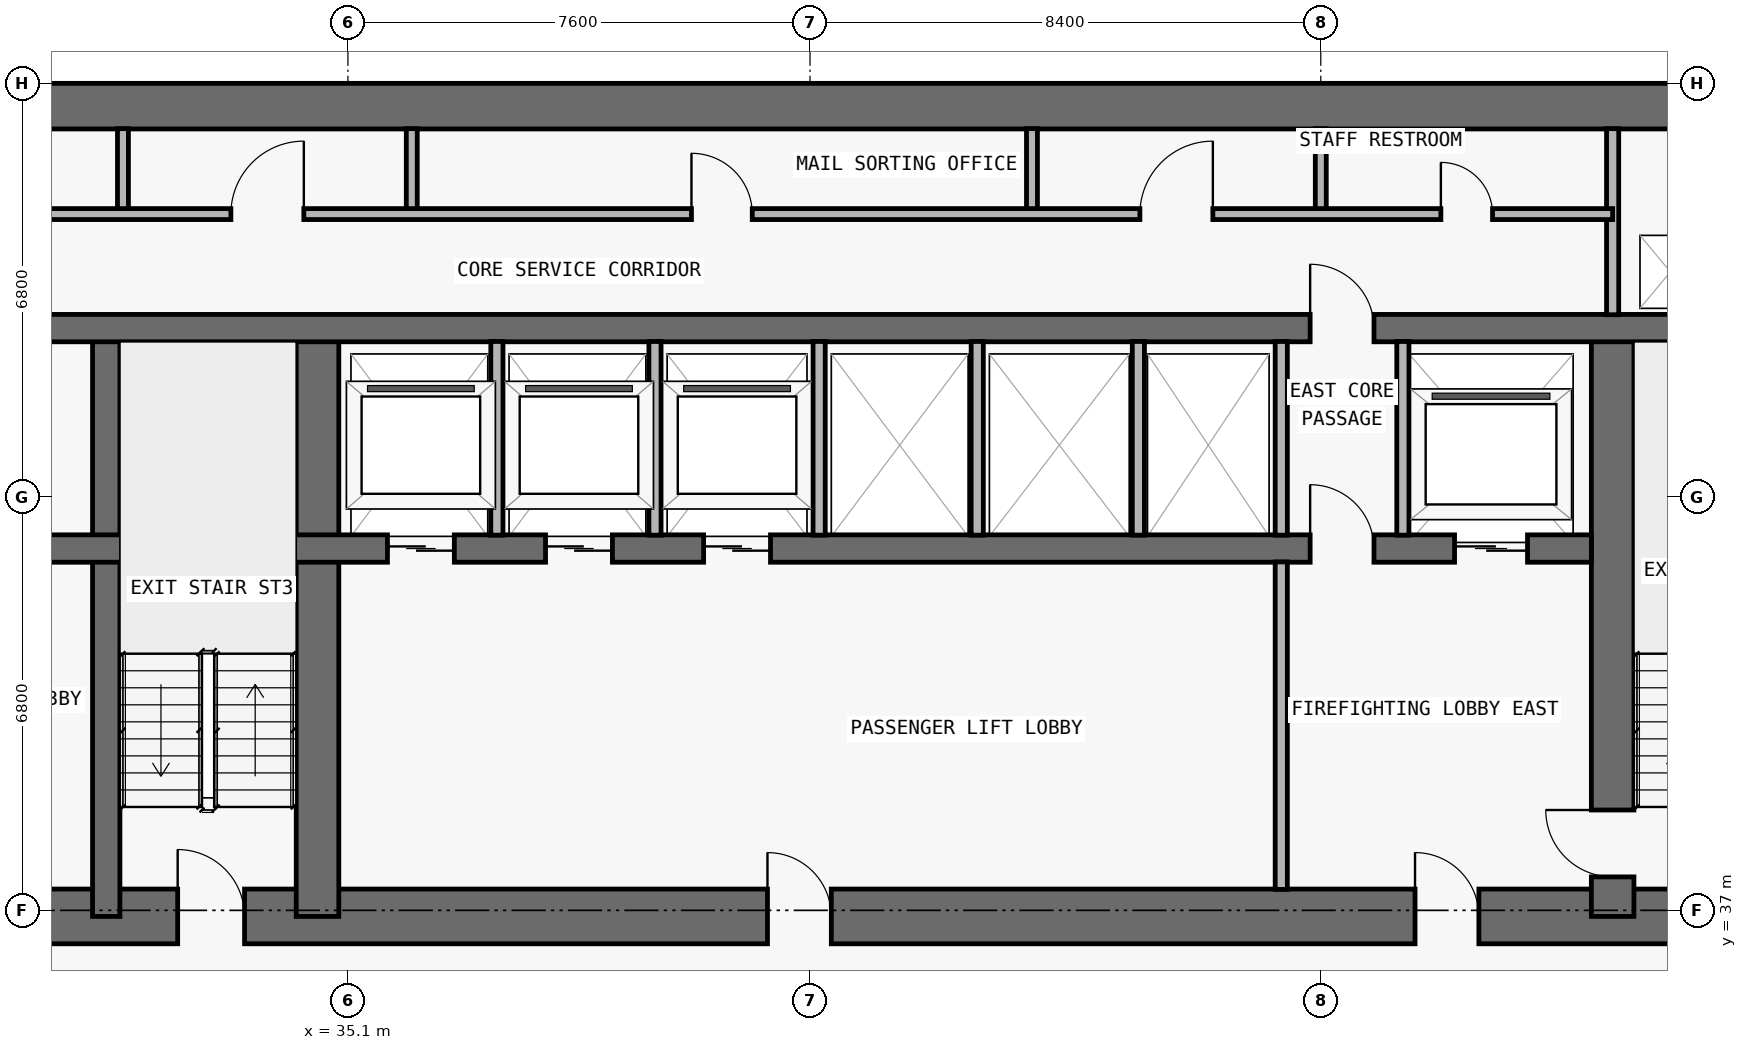
"""IFC4 building model, lengths in metres.
Left out: names, types, materials, properties, quantities, classifications, styles, units other than length and angle.
Written with IfcOpenShell. Run it as: python <this file> out.ifc"""

import sys

from ifc_helpers import new_model, si_unit, direction, frame, frame_2d, origin, place, context, subcontext, project, spatial, rectangle, extrude, element, fill, save


model = new_model("IFC4")
c1 = context("Model", 3, precision=1e-05, world=origin(), true_north=direction((0.0, 1.0)))
c2 = subcontext(c1, "Body", "Model", "MODEL_VIEW")
j1 = project(units=[si_unit("LENGTHUNIT", "METRE"), si_unit("PLANEANGLEUNIT", "RADIAN")], contexts=[c1])
p1 = place(None, origin())
s1 = spatial("IfcSite", under=j1, at=p1, CompositionType="ELEMENT")
p2 = place(p1, origin())
s2 = spatial("IfcBuilding", under=s1, at=p2, CompositionType="ELEMENT")
p3 = place(p2, frame((0.0, 0.0, 66.3)))
s3 = spatial("IfcBuildingStorey", under=s2, at=p3, CompositionType="ELEMENT", Elevation=66.3)
p4 = place(p3, frame((17.75, 36.9, 0.0), z_axis=(0.0, 0.0, 1.0), x_axis=(1.0, 0.0, 0.0)))
e1 = element("IfcWall", 1, at=p4, inside=s3, PredefinedType="SHEAR", context=c2, shape_type="SweptSolid", body=[
    extrude(rectangle(XDim=42.3, YDim=0.9, at=frame_2d((21.15, 0.0))), origin(), (0.0, 0.0, 1.0), 3.05),
])
p5 = place(p4, frame((14.55, 0.0, 0.0)))
e2 = element("IfcOpeningElement", 2, at=p5, cuts=e1, PredefinedType="OPENING", context=c2, shape_type="SweptSolid", body=[
    extrude(rectangle(XDim=1.1, YDim=2.15, at=frame_2d((0.55, 1.075))), frame((0.0, 0.46, 0.0), z_axis=(0.0, -1.0, 0.0), x_axis=(1.0, 0.0, 0.0)), (0.0, 0.0, 1.0), 0.92),
])
p6 = place(p4, frame((6.4, 0.0, 0.0)))
e3 = element("IfcOpeningElement", 3, at=p6, cuts=e1, PredefinedType="OPENING", context=c2, shape_type="SweptSolid", body=[
    extrude(rectangle(XDim=1.05, YDim=2.15, at=frame_2d((0.525, 1.075))), frame((0.0, 0.46, 0.0), z_axis=(0.0, -1.0, 0.0), x_axis=(1.0, 0.0, 0.0)), (0.0, 0.0, 1.0), 0.92),
])
p7 = place(p4, frame((34.9, 0.0, 0.0)))
e4 = element("IfcOpeningElement", 4, at=p7, cuts=e1, PredefinedType="OPENING", context=c2, shape_type="SweptSolid", body=[
    extrude(rectangle(XDim=1.05, YDim=2.15, at=frame_2d((0.525, 1.075))), frame((0.0, 0.46, 0.0), z_axis=(0.0, -1.0, 0.0), x_axis=(1.0, 0.0, 0.0)), (0.0, 0.0, 1.0), 0.92),
])
p8 = place(p4, frame((11.012, 0.0, 0.0)))
e5 = element("IfcOpeningElement", 5, at=p8, cuts=e1, PredefinedType="OPENING", context=c2, shape_type="SweptSolid", body=[
    extrude(rectangle(XDim=1.05, YDim=2.15, at=frame_2d((0.525, 1.075))), frame((0.0, 0.46, 0.0), z_axis=(0.0, -1.0, 0.0), x_axis=(1.0, 0.0, 0.0)), (0.0, 0.0, 1.0), 0.92),
])
p9 = place(p4, frame((24.25, 0.0, 0.0)))
e6 = element("IfcOpeningElement", 6, at=p9, cuts=e1, PredefinedType="OPENING", context=c2, shape_type="SweptSolid", body=[
    extrude(rectangle(XDim=1.05, YDim=2.15, at=frame_2d((0.525, 1.075))), frame((0.0, 0.46, 0.0), z_axis=(0.0, -1.0, 0.0), x_axis=(1.0, 0.0, 0.0)), (0.0, 0.0, 1.0), 0.92),
])
p10 = place(p3, frame((17.75, 50.225, 0.0), z_axis=(0.0, 0.0, 1.0), x_axis=(1.0, 0.0, 0.0)))
e7 = element("IfcWall", 7, at=p10, inside=s3, PredefinedType="SHEAR", context=c2, shape_type="SweptSolid", body=[
    extrude(rectangle(XDim=42.3, YDim=0.75, at=frame_2d((21.15, 0.0))), origin(), (0.0, 0.0, 1.0), 3.05),
])
p11 = place(p3, frame((55.9, 36.9, 0.0), z_axis=(0.0, 0.0, 1.0), x_axis=(0.0, 1.0, 0.0)))
e8 = element("IfcWall", 8, at=p11, inside=s3, PredefinedType="SHEAR", context=c2, shape_type="SweptSolid", body=[
    extrude(rectangle(XDim=9.675, YDim=0.7, at=frame_2d((4.837, 0.0))), origin(), (0.0, 0.0, 1.0), 3.05),
])
p12 = place(p11, frame((0.65, 0.0, 0.0)))
e9 = element("IfcOpeningElement", 9, at=p12, cuts=e8, PredefinedType="OPENING", context=c2, shape_type="SweptSolid", body=[
    extrude(rectangle(XDim=1.1, YDim=2.15, at=frame_2d((0.55, 1.075))), frame((0.0, 0.36, 0.0), z_axis=(0.0, -1.0, 0.0), x_axis=(1.0, 0.0, 0.0)), (0.0, 0.0, 1.0), 0.72),
])
p13 = place(p3, frame((31.125, 36.9, 0.0), z_axis=(0.0, 0.0, 1.0), x_axis=(0.0, 1.0, 0.0)))
e10 = element("IfcWall", 10, at=p13, inside=s3, PredefinedType="SHEAR", context=c2, shape_type="SweptSolid", body=[
    extrude(rectangle(XDim=9.675, YDim=0.45, at=frame_2d((4.837, 0.0))), origin(), (0.0, 0.0, 1.0), 3.05),
])
p14 = place(p3, frame((34.6, 36.9, 0.0), z_axis=(0.0, 0.0, 1.0), x_axis=(0.0, 1.0, 0.0)))
e11 = element("IfcWall", 11, at=p14, inside=s3, PredefinedType="SHEAR", context=c2, shape_type="SweptSolid", body=[
    extrude(rectangle(XDim=9.675, YDim=0.7, at=frame_2d((4.837, 0.0))), origin(), (0.0, 0.0, 1.0), 3.05),
])
p15 = place(p3, frame((22.25, 42.95, 0.0), z_axis=(0.0, 0.0, 1.0), x_axis=(1.0, 0.0, 0.0)))
e12 = element("IfcWall", 12, at=p15, inside=s3, PredefinedType="SHEAR", context=c2, shape_type="SweptSolid", body=[
    extrude(rectangle(XDim=33.3, YDim=0.45, at=frame_2d((16.65, 0.0))), origin(), (0.0, 0.0, 1.0), 3.05),
])
p16 = place(p15, frame((1.05, 0.0, 0.0)))
e13 = element("IfcOpeningElement", 13, at=p16, cuts=e12, PredefinedType="OPENING", context=c2, shape_type="SweptSolid", body=[
    extrude(rectangle(XDim=1.2, YDim=2.2, at=frame_2d((0.6, 1.1))), frame((0.0, 0.235, 0.0), z_axis=(0.0, -1.0, 0.0), x_axis=(1.0, 0.0, 0.0)), (0.0, 0.0, 1.0), 0.47),
])
p17 = place(p15, frame((31.05, 0.0, 0.0)))
e14 = element("IfcOpeningElement", 14, at=p17, cuts=e12, PredefinedType="OPENING", context=c2, shape_type="SweptSolid", body=[
    extrude(rectangle(XDim=1.2, YDim=2.2, at=frame_2d((0.6, 1.1))), frame((0.0, 0.235, 0.0), z_axis=(0.0, -1.0, 0.0), x_axis=(1.0, 0.0, 0.0)), (0.0, 0.0, 1.0), 0.47),
])
p18 = place(p15, frame((13.5, 0.0, 0.0)))
e15 = element("IfcOpeningElement", 15, at=p18, cuts=e12, PredefinedType="OPENING", context=c2, shape_type="SweptSolid", body=[
    extrude(rectangle(XDim=1.1, YDim=2.2, at=frame_2d((0.55, 1.1))), frame((0.0, 0.235, 0.0), z_axis=(0.0, -1.0, 0.0), x_axis=(1.0, 0.0, 0.0)), (0.0, 0.0, 1.0), 0.47),
])
p19 = place(p15, frame((16.1, 0.0, 0.0)))
e16 = element("IfcOpeningElement", 16, at=p19, cuts=e12, PredefinedType="OPENING", context=c2, shape_type="SweptSolid", body=[
    extrude(rectangle(XDim=1.1, YDim=2.2, at=frame_2d((0.55, 1.1))), frame((0.0, 0.235, 0.0), z_axis=(0.0, -1.0, 0.0), x_axis=(1.0, 0.0, 0.0)), (0.0, 0.0, 1.0), 0.47),
])
p20 = place(p15, frame((18.7, 0.0, 0.0)))
e17 = element("IfcOpeningElement", 17, at=p20, cuts=e12, PredefinedType="OPENING", context=c2, shape_type="SweptSolid", body=[
    extrude(rectangle(XDim=1.1, YDim=2.2, at=frame_2d((0.55, 1.1))), frame((0.0, 0.235, 0.0), z_axis=(0.0, -1.0, 0.0), x_axis=(1.0, 0.0, 0.0)), (0.0, 0.0, 1.0), 0.47),
])
p21 = place(p15, frame((3.625, 0.0, 0.0)))
e18 = element("IfcOpeningElement", 18, at=p21, cuts=e12, PredefinedType="OPENING", context=c2, shape_type="SweptSolid", body=[
    extrude(rectangle(XDim=1.05, YDim=2.15, at=frame_2d((0.525, 1.075))), frame((0.0, 0.235, 0.0), z_axis=(0.0, -1.0, 0.0), x_axis=(1.0, 0.0, 0.0)), (0.0, 0.0, 1.0), 0.47),
])
p22 = place(p15, frame((28.675, 0.0, 0.0)))
e19 = element("IfcOpeningElement", 19, at=p22, cuts=e12, PredefinedType="OPENING", context=c2, shape_type="SweptSolid", body=[
    extrude(rectangle(XDim=1.05, YDim=2.15, at=frame_2d((0.525, 1.075))), frame((0.0, 0.235, 0.0), z_axis=(0.0, -1.0, 0.0), x_axis=(1.0, 0.0, 0.0)), (0.0, 0.0, 1.0), 0.47),
])
p23 = place(p3, frame((18.2, 46.575, 0.0), z_axis=(0.0, 0.0, 1.0), x_axis=(1.0, 0.0, 0.0)))
e20 = element("IfcWall", 20, at=p23, inside=s3, PredefinedType="SHEAR", context=c2, shape_type="SweptSolid", body=[
    extrude(rectangle(XDim=41.4, YDim=0.45, at=frame_2d((20.7, 0.0))), origin(), (0.0, 0.0, 1.0), 3.05),
])
p24 = place(p23, frame((7.675, 0.0, 0.0)))
e21 = element("IfcOpeningElement", 21, at=p24, cuts=e20, PredefinedType="OPENING", context=c2, shape_type="SweptSolid", body=[
    extrude(rectangle(XDim=1.05, YDim=2.15, at=frame_2d((0.525, 1.075))), frame((0.0, 0.235, 0.0), z_axis=(0.0, -1.0, 0.0), x_axis=(1.0, 0.0, 0.0)), (0.0, 0.0, 1.0), 0.47),
])
p25 = place(p23, frame((32.725, 0.0, 0.0)))
e22 = element("IfcOpeningElement", 22, at=p25, cuts=e20, PredefinedType="OPENING", context=c2, shape_type="SweptSolid", body=[
    extrude(rectangle(XDim=1.05, YDim=2.15, at=frame_2d((0.525, 1.075))), frame((0.0, 0.235, 0.0), z_axis=(0.0, -1.0, 0.0), x_axis=(1.0, 0.0, 0.0)), (0.0, 0.0, 1.0), 0.47),
])
for number, where, z_axis, x_axis in (
    (23, (31.4, 48.45, 0.0), (0.0, 0.0, 1.0), (0.0, 1.0, 0.0)),
    (24, (36.15, 48.45, 0.0), (0.0, 0.0, 1.0), (0.0, 1.0, 0.0)),
):
    element("IfcWall", number, at=place(p3, frame(where, z_axis=z_axis, x_axis=x_axis)), inside=s3, PredefinedType="PARTITIONING", context=c2, shape_type="SweptSolid", body=[
        extrude(rectangle(XDim=1.405, YDim=0.18, at=frame_2d((0.703, 0.0))), origin(), (0.0, 0.0, 1.0), 3.05),
    ])
for number, where, z_axis, x_axis in (
    (25, (37.55, 43.17, 0.0), (0.0, 0.0, 1.0), (0.0, 1.0, 0.0)),
    (26, (40.15, 43.17, 0.0), (0.0, 0.0, 1.0), (0.0, 1.0, 0.0)),
    (27, (42.85, 43.17, 0.0), (0.0, 0.0, 1.0), (0.0, 1.0, 0.0)),
    (28, (45.45, 43.17, 0.0), (0.0, 0.0, 1.0), (0.0, 1.0, 0.0)),
):
    element("IfcWall", number, at=place(p3, frame(where, z_axis=z_axis, x_axis=x_axis)), inside=s3, PredefinedType="PARTITIONING", context=c2, shape_type="SweptSolid", body=[
        extrude(rectangle(XDim=3.185, YDim=0.2, at=frame_2d((1.593, 0.0))), origin(), (0.0, 0.0, 1.0), 3.05),
    ])
p26 = place(p3, frame((46.35, 48.45, 0.0), z_axis=(0.0, 0.0, 1.0), x_axis=(0.0, 1.0, 0.0)))
e29 = element("IfcWall", 29, at=p26, inside=s3, PredefinedType="PARTITIONING", context=c2, shape_type="SweptSolid", body=[
    extrude(rectangle(XDim=1.405, YDim=0.18, at=frame_2d((0.703, 0.0))), origin(), (0.0, 0.0, 1.0), 3.05),
])
p27 = place(p3, frame((48.1, 43.17, 0.0), z_axis=(0.0, 0.0, 1.0), x_axis=(0.0, 1.0, 0.0)))
e30 = element("IfcWall", 30, at=p27, inside=s3, PredefinedType="PARTITIONING", context=c2, shape_type="SweptSolid", body=[
    extrude(rectangle(XDim=3.185, YDim=0.2, at=frame_2d((1.593, 0.0))), origin(), (0.0, 0.0, 1.0), 3.05),
])
p28 = place(p3, frame((50.45, 37.345, 0.0), z_axis=(0.0, 0.0, 1.0), x_axis=(0.0, 1.0, 0.0)))
e31 = element("IfcWall", 31, at=p28, inside=s3, PredefinedType="PARTITIONING", context=c2, shape_type="SweptSolid", body=[
    extrude(rectangle(XDim=5.385, YDim=0.2, at=frame_2d((2.692, 0.0))), origin(), (0.0, 0.0, 1.0), 3.05),
])
p29 = place(p3, frame((50.45, 43.17, 0.0), z_axis=(0.0, 0.0, 1.0), x_axis=(0.0, 1.0, 0.0)))
e32 = element("IfcWall", 32, at=p29, inside=s3, PredefinedType="PARTITIONING", context=c2, shape_type="SweptSolid", body=[
    extrude(rectangle(XDim=3.185, YDim=0.2, at=frame_2d((1.593, 0.0))), origin(), (0.0, 0.0, 1.0), 3.05),
])
p30 = place(p3, frame((51.1, 48.45, 0.0), z_axis=(0.0, 0.0, 1.0), x_axis=(0.0, 1.0, 0.0)))
e33 = element("IfcWall", 33, at=p30, inside=s3, PredefinedType="PARTITIONING", context=c2, shape_type="SweptSolid", body=[
    extrude(rectangle(XDim=1.405, YDim=0.18, at=frame_2d((0.703, 0.0))), origin(), (0.0, 0.0, 1.0), 3.05),
])
p31 = place(p3, frame((52.45, 43.17, 0.0), z_axis=(0.0, 0.0, 1.0), x_axis=(0.0, 1.0, 0.0)))
e34 = element("IfcWall", 34, at=p31, inside=s3, PredefinedType="PARTITIONING", context=c2, shape_type="SweptSolid", body=[
    extrude(rectangle(XDim=3.185, YDim=0.2, at=frame_2d((1.593, 0.0))), origin(), (0.0, 0.0, 1.0), 3.05),
])
p32 = place(p3, frame((55.9, 46.795, 0.0), z_axis=(0.0, 0.0, 1.0), x_axis=(0.0, 1.0, 0.0)))
e35 = element("IfcWall", 35, at=p32, inside=s3, PredefinedType="PARTITIONING", context=c2, shape_type="SweptSolid", body=[
    extrude(rectangle(XDim=3.06, YDim=0.2, at=frame_2d((1.53, 0.0))), origin(), (0.0, 0.0, 1.0), 3.05),
])
p33 = place(p3, frame((26.7, 48.45, 0.0), z_axis=(0.0, 0.0, 1.0), x_axis=(1.0, 0.0, 0.0)))
e36 = element("IfcWall", 36, at=p33, inside=s3, PredefinedType="PARTITIONING", context=c2, shape_type="SweptSolid", body=[
    extrude(rectangle(XDim=29.2, YDim=0.18, at=frame_2d((14.6, 0.0))), origin(), (0.0, 0.0, 1.0), 3.05),
])
p34 = place(p33, frame((1.75, 0.0, 0.0)))
e37 = element("IfcOpeningElement", 37, at=p34, cuts=e36, PredefinedType="OPENING", context=c2, shape_type="SweptSolid", body=[
    extrude(rectangle(XDim=1.2, YDim=2.2, at=frame_2d((0.6, 1.1))), frame((0.0, 0.1, 0.0), z_axis=(0.0, -1.0, 0.0), x_axis=(1.0, 0.0, 0.0)), (0.0, 0.0, 1.0), 0.2),
])
p35 = place(p33, frame((6.475, 0.0, 0.0)))
e38 = element("IfcOpeningElement", 38, at=p35, cuts=e36, PredefinedType="OPENING", context=c2, shape_type="SweptSolid", body=[
    extrude(rectangle(XDim=1.2, YDim=2.2, at=frame_2d((0.6, 1.1))), frame((0.0, 0.1, 0.0), z_axis=(0.0, -1.0, 0.0), x_axis=(1.0, 0.0, 0.0)), (0.0, 0.0, 1.0), 0.2),
])
p36 = place(p33, frame((14.05, 0.0, 0.0)))
e39 = element("IfcOpeningElement", 39, at=p36, cuts=e36, PredefinedType="OPENING", context=c2, shape_type="SweptSolid", body=[
    extrude(rectangle(XDim=1.0, YDim=2.2, at=frame_2d((0.5, 1.1))), frame((0.0, 0.1, 0.0), z_axis=(0.0, -1.0, 0.0), x_axis=(1.0, 0.0, 0.0)), (0.0, 0.0, 1.0), 0.2),
])
p37 = place(p33, frame((21.425, 0.0, 0.0)))
e40 = element("IfcOpeningElement", 40, at=p37, cuts=e36, PredefinedType="OPENING", context=c2, shape_type="SweptSolid", body=[
    extrude(rectangle(XDim=1.2, YDim=2.2, at=frame_2d((0.6, 1.1))), frame((0.0, 0.1, 0.0), z_axis=(0.0, -1.0, 0.0), x_axis=(1.0, 0.0, 0.0)), (0.0, 0.0, 1.0), 0.2),
])
p38 = place(p33, frame((26.375, 0.0, 0.0)))
e41 = element("IfcOpeningElement", 41, at=p38, cuts=e36, PredefinedType="OPENING", context=c2, shape_type="SweptSolid", body=[
    extrude(rectangle(XDim=0.85, YDim=2.1, at=frame_2d((0.425, 1.05))), frame((0.0, 0.1, 0.0), z_axis=(0.0, -1.0, 0.0), x_axis=(1.0, 0.0, 0.0)), (0.0, 0.0, 1.0), 0.2),
])
p39 = place(p17, origin())
e42 = element("IfcDoor", 42, at=p39, inside=s3, OperationType="DOUBLE_DOOR_SLIDING", PredefinedType="DOOR", context=c2, shape_type="SweptSolid", body=[
    extrude(rectangle(XDim=1.2, YDim=2.2, at=frame_2d((0.6, 1.1))), frame((0.0, 0.025, 0.0), z_axis=(0.0, -1.0, 0.0), x_axis=(1.0, 0.0, 0.0)), (0.0, 0.0, 1.0), 0.05),
])
fill(e14, e42)
p40 = place(p18, origin())
e43 = element("IfcDoor", 43, at=p40, inside=s3, OperationType="DOUBLE_DOOR_SLIDING", PredefinedType="DOOR", context=c2, shape_type="SweptSolid", body=[
    extrude(rectangle(XDim=1.1, YDim=2.2, at=frame_2d((0.55, 1.1))), frame((0.0, 0.025, 0.0), z_axis=(0.0, -1.0, 0.0), x_axis=(1.0, 0.0, 0.0)), (0.0, 0.0, 1.0), 0.05),
])
fill(e15, e43)
p41 = place(p19, origin())
e44 = element("IfcDoor", 44, at=p41, inside=s3, OperationType="DOUBLE_DOOR_SLIDING", PredefinedType="DOOR", context=c2, shape_type="SweptSolid", body=[
    extrude(rectangle(XDim=1.1, YDim=2.2, at=frame_2d((0.55, 1.1))), frame((0.0, 0.025, 0.0), z_axis=(0.0, -1.0, 0.0), x_axis=(1.0, 0.0, 0.0)), (0.0, 0.0, 1.0), 0.05),
])
fill(e16, e44)
p42 = place(p20, origin())
e45 = element("IfcDoor", 45, at=p42, inside=s3, OperationType="DOUBLE_DOOR_SLIDING", PredefinedType="DOOR", context=c2, shape_type="SweptSolid", body=[
    extrude(rectangle(XDim=1.1, YDim=2.2, at=frame_2d((0.55, 1.1))), frame((0.0, 0.025, 0.0), z_axis=(0.0, -1.0, 0.0), x_axis=(1.0, 0.0, 0.0)), (0.0, 0.0, 1.0), 0.05),
])
fill(e17, e45)
p43 = place(p5, origin())
e46 = element("IfcDoor", 46, at=p43, inside=s3, OperationType="SINGLE_SWING_LEFT", PredefinedType="DOOR", context=c2, shape_type="SweptSolid", body=[
    extrude(rectangle(XDim=1.1, YDim=2.15, at=frame_2d((0.55, 1.075))), frame((0.0, 0.025, 0.0), z_axis=(0.0, -1.0, 0.0), x_axis=(1.0, 0.0, 0.0)), (0.0, 0.0, 1.0), 0.05),
])
fill(e2, e46)
p44 = place(p7, origin())
e47 = element("IfcDoor", 47, at=p44, inside=s3, OperationType="SINGLE_SWING_LEFT", PredefinedType="DOOR", context=c2, shape_type="SweptSolid", body=[
    extrude(rectangle(XDim=1.05, YDim=2.15, at=frame_2d((0.525, 1.075))), frame((0.0, 0.025, 0.0), z_axis=(0.0, -1.0, 0.0), x_axis=(1.0, 0.0, 0.0)), (0.0, 0.0, 1.0), 0.05),
])
fill(e4, e47)
p45 = place(p12, origin())
e48 = element("IfcDoor", 48, at=p45, inside=s3, OperationType="SINGLE_SWING_RIGHT", PredefinedType="DOOR", context=c2, shape_type="SweptSolid", body=[
    extrude(rectangle(XDim=1.1, YDim=2.15, at=frame_2d((0.55, 1.075))), frame((0.0, 0.025, 0.0), z_axis=(0.0, -1.0, 0.0), x_axis=(1.0, 0.0, 0.0)), (0.0, 0.0, 1.0), 0.05),
])
fill(e9, e48)
p46 = place(p22, origin())
e49 = element("IfcDoor", 49, at=p46, inside=s3, OperationType="SINGLE_SWING_LEFT", PredefinedType="DOOR", context=c2, shape_type="SweptSolid", body=[
    extrude(rectangle(XDim=1.05, YDim=2.15, at=frame_2d((0.525, 1.075))), frame((0.0, 0.025, 0.0), z_axis=(0.0, -1.0, 0.0), x_axis=(1.0, 0.0, 0.0)), (0.0, 0.0, 1.0), 0.05),
])
fill(e19, e49)
p47 = place(p9, origin())
e50 = element("IfcDoor", 50, at=p47, inside=s3, OperationType="SINGLE_SWING_LEFT", PredefinedType="DOOR", context=c2, shape_type="SweptSolid", body=[
    extrude(rectangle(XDim=1.05, YDim=2.15, at=frame_2d((0.525, 1.075))), frame((0.0, 0.025, 0.0), z_axis=(0.0, -1.0, 0.0), x_axis=(1.0, 0.0, 0.0)), (0.0, 0.0, 1.0), 0.05),
])
fill(e6, e50)
p48 = place(p25, origin())
e51 = element("IfcDoor", 51, at=p48, inside=s3, OperationType="SINGLE_SWING_LEFT", PredefinedType="DOOR", context=c2, shape_type="SweptSolid", body=[
    extrude(rectangle(XDim=1.05, YDim=2.15, at=frame_2d((0.525, 1.075))), frame((0.0, 0.025, 0.0), z_axis=(0.0, -1.0, 0.0), x_axis=(1.0, 0.0, 0.0)), (0.0, 0.0, 1.0), 0.05),
])
fill(e22, e51)
p49 = place(p35, origin())
e52 = element("IfcDoor", 52, at=p49, inside=s3, OperationType="SINGLE_SWING_RIGHT", PredefinedType="DOOR", context=c2, shape_type="SweptSolid", body=[
    extrude(rectangle(XDim=1.2, YDim=2.2, at=frame_2d((0.6, 1.1))), frame((0.0, 0.025, 0.0), z_axis=(0.0, -1.0, 0.0), x_axis=(1.0, 0.0, 0.0)), (0.0, 0.0, 1.0), 0.05),
])
fill(e38, e52)
p50 = place(p36, origin())
e53 = element("IfcDoor", 53, at=p50, inside=s3, OperationType="SINGLE_SWING_LEFT", PredefinedType="DOOR", context=c2, shape_type="SweptSolid", body=[
    extrude(rectangle(XDim=1.0, YDim=2.2, at=frame_2d((0.5, 1.1))), frame((0.0, 0.025, 0.0), z_axis=(0.0, -1.0, 0.0), x_axis=(1.0, 0.0, 0.0)), (0.0, 0.0, 1.0), 0.05),
])
fill(e39, e53)
p51 = place(p37, origin())
e54 = element("IfcDoor", 54, at=p51, inside=s3, OperationType="SINGLE_SWING_RIGHT", PredefinedType="DOOR", context=c2, shape_type="SweptSolid", body=[
    extrude(rectangle(XDim=1.2, YDim=2.2, at=frame_2d((0.6, 1.1))), frame((0.0, 0.025, 0.0), z_axis=(0.0, -1.0, 0.0), x_axis=(1.0, 0.0, 0.0)), (0.0, 0.0, 1.0), 0.05),
])
fill(e40, e54)
p52 = place(p38, origin())
e55 = element("IfcDoor", 55, at=p52, inside=s3, OperationType="SINGLE_SWING_LEFT", PredefinedType="DOOR", context=c2, shape_type="SweptSolid", body=[
    extrude(rectangle(XDim=0.85, YDim=2.1, at=frame_2d((0.425, 1.05))), frame((0.0, 0.025, 0.0), z_axis=(0.0, -1.0, 0.0), x_axis=(1.0, 0.0, 0.0)), (0.0, 0.0, 1.0), 0.05),
])
fill(e41, e55)
save(model, sys.argv[1])
